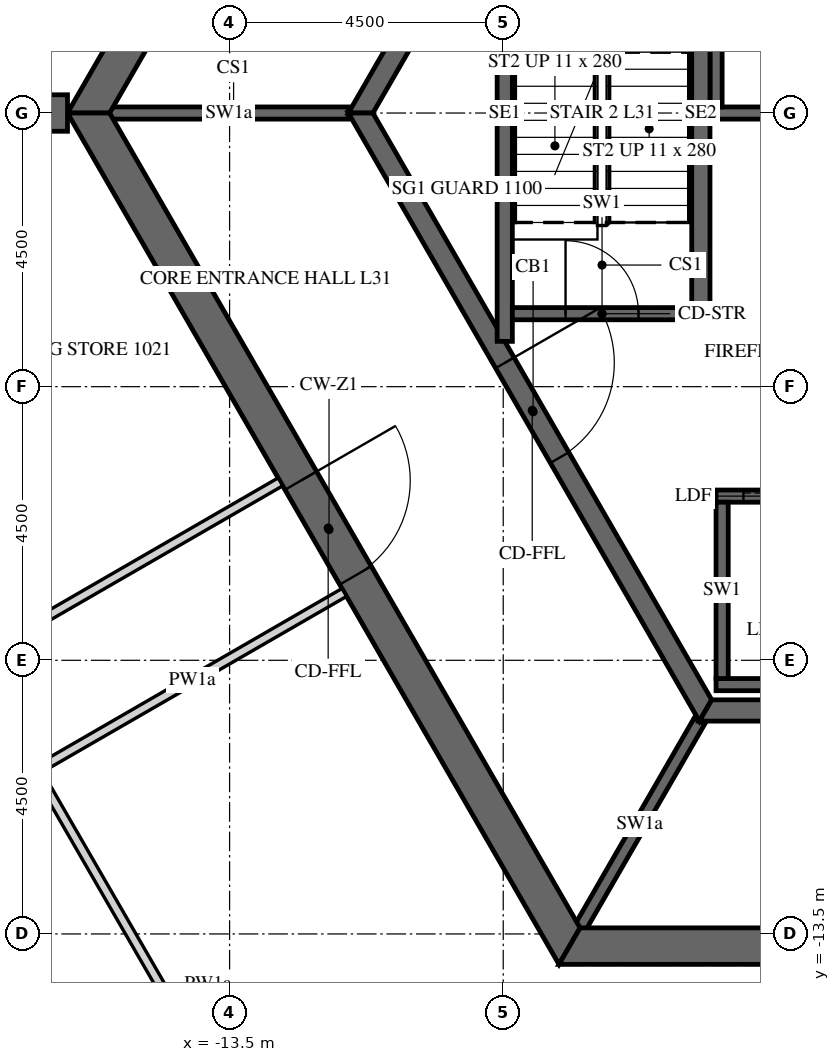
"""IFC4 building model, lengths in metres.
Left out: names, types, materials, properties, quantities, classifications, styles, units other than length and angle.
Written with IfcOpenShell. Run it as: python <this file> out.ifc"""

import sys

from ifc_helpers import new_model, si_unit, direction, frame, frame_2d, origin, place, context, subcontext, project, spatial, polyline, rectangle, outline, extrude, element, fill, save


model = new_model("IFC4")
c1 = context("Model", 3, precision=1e-05, world=origin(), true_north=direction((0.0, 1.0)))
c2 = subcontext(c1, "Body", "Model", "MODEL_VIEW")
j1 = project(units=[si_unit("LENGTHUNIT", "METRE"), si_unit("PLANEANGLEUNIT", "RADIAN")], contexts=[c1])
p1 = place(None, origin())
s1 = spatial("IfcSite", under=j1, at=p1, CompositionType="ELEMENT")
p2 = place(p1, origin())
s2 = spatial("IfcBuilding", under=s1, at=p2, CompositionType="ELEMENT")
p3 = place(p2, frame((0.0, 0.0, 135.0)))
s3 = spatial("IfcBuildingStorey", under=s2, at=p3, CompositionType="ELEMENT", Elevation=135.0)
p4 = place(p3, frame((-7.91, 13.7, -0.15), z_axis=(0.0, 0.0, 1.0), x_axis=(-0.499999880136, -0.866025472988, 0.0)))
e1 = element("IfcWall", 1, at=p4, inside=s3, PredefinedType="SHEAR", context=c2, shape_type="SweptSolid", body=[
    extrude(outline(polyline([(-0.173, -0.3), (15.993, -0.3), (15.646, 0.3), (0.173, 0.3), (-0.173, -0.3)])), origin(), (0.0, 0.0, 1.0), 3.9),
])
p5 = place(p4, frame((7.039, 0.0, 0.15)))
e2 = element("IfcOpeningElement", 2, at=p5, cuts=e1, PredefinedType="OPENING", context=c2, shape_type="SweptSolid", body=[
    extrude(rectangle(XDim=1.8, YDim=2.4, at=frame_2d((0.9, 1.2))), frame((0.0, 0.31, 0.0), z_axis=(0.0, -1.0, 0.0), x_axis=(1.0, 0.0, 0.0)), (0.0, 0.0, 1.0), 0.62),
])
p6 = place(p3, frame((-15.819, 0.0, -0.15), z_axis=(0.0, 0.0, 1.0), x_axis=(0.499999880136, -0.866025472988, 0.0)))
e3 = element("IfcWall", 3, at=p6, inside=s3, PredefinedType="SHEAR", context=c2, shape_type="SweptSolid", body=[
    extrude(outline(polyline([(-0.173, -0.3), (15.993, -0.3), (15.646, 0.3), (0.173, 0.3), (-0.173, -0.3)])), origin(), (0.0, 0.0, 1.0), 3.9),
])
p7 = place(p6, frame((6.981, 0.0, 0.15)))
e4 = element("IfcOpeningElement", 4, at=p7, cuts=e3, PredefinedType="OPENING", context=c2, shape_type="SweptSolid", body=[
    extrude(rectangle(XDim=1.8, YDim=2.4, at=frame_2d((0.9, 1.2))), frame((0.0, 0.31, 0.0), z_axis=(0.0, -1.0, 0.0), x_axis=(1.0, 0.0, 0.0)), (0.0, 0.0, 1.0), 0.62),
])
p8 = place(p3, frame((-7.91, -13.7, -0.15), z_axis=(0.0, 0.0, 1.0), x_axis=(1.0, 0.0, 0.0)))
e5 = element("IfcWall", 5, at=p8, inside=s3, PredefinedType="SHEAR", context=c2, shape_type="SweptSolid", body=[
    extrude(outline(polyline([(-0.173, -0.3), (15.993, -0.3), (15.646, 0.3), (0.173, 0.3), (-0.173, -0.3)])), origin(), (0.0, 0.0, 1.0), 3.9),
])
p9 = place(p8, frame((7.31, 0.0, 0.15)))
e6 = element("IfcOpeningElement", 6, at=p9, cuts=e5, PredefinedType="OPENING", context=c2, shape_type="SweptSolid", body=[
    extrude(rectangle(XDim=1.2, YDim=2.4, at=frame_2d((0.6, 1.2))), frame((0.0, 0.31, 0.0), z_axis=(0.0, -1.0, 0.0), x_axis=(1.0, 0.0, 0.0)), (0.0, 0.0, 1.0), 0.62),
])
p10 = place(p3, frame((-16.166, 0.0, -0.15), z_axis=(0.0, 0.0, 1.0), x_axis=(-1.0, 0.0, 0.0)))
e7 = element("IfcWall", 7, at=p10, inside=s3, PredefinedType="SHEAR", context=c2, shape_type="SweptSolid", body=[
    extrude(rectangle(XDim=16.509, YDim=0.6, at=frame_2d((8.254, 0.0))), origin(), (0.0, 0.0, 1.0), 3.9),
])
p11 = place(p10, frame((7.354, 0.0, 0.15)))
e8 = element("IfcOpeningElement", 8, at=p11, cuts=e7, PredefinedType="OPENING", context=c2, shape_type="SweptSolid", body=[
    extrude(rectangle(XDim=1.8, YDim=2.4, at=frame_2d((0.9, 1.2))), frame((0.0, 0.31, 0.0), z_axis=(0.0, -1.0, 0.0), x_axis=(1.0, 0.0, 0.0)), (0.0, 0.0, 1.0), 0.62),
])
p12 = place(p3, frame((-5.673, 9.825, -0.15), z_axis=(0.0, 0.0, 1.0), x_axis=(-0.499995046907, -0.866028263435, 0.0)))
e9 = element("IfcWall", 9, at=p12, inside=s3, PredefinedType="SHEAR", context=c2, shape_type="SweptSolid", body=[
    extrude(outline(polyline([(-0.101, -0.175), (11.446, -0.175), (11.244, 0.175), (0.101, 0.175), (-0.101, -0.175)])), origin(), (0.0, 0.0, 1.0), 3.9),
])
p13 = place(p12, frame((4.801, 0.0, 0.15)))
e10 = element("IfcOpeningElement", 10, at=p13, cuts=e9, PredefinedType="OPENING", context=c2, shape_type="SweptSolid", body=[
    extrude(rectangle(XDim=1.8, YDim=2.4, at=frame_2d((0.9, 1.2))), frame((0.0, 0.185, 0.0), z_axis=(0.0, -1.0, 0.0), x_axis=(1.0, 0.0, 0.0)), (0.0, 0.0, 1.0), 0.37),
])
p14 = place(p3, frame((-11.345, 0.0, -0.15), z_axis=(0.0, 0.0, 1.0), x_axis=(0.499995046907, -0.866028263435, 0.0)))
e11 = element("IfcWall", 11, at=p14, inside=s3, PredefinedType="SHEAR", context=c2, shape_type="SweptSolid", body=[
    extrude(outline(polyline([(-0.101, -0.175), (11.446, -0.175), (11.244, 0.175), (0.101, 0.175), (-0.101, -0.175)])), origin(), (0.0, 0.0, 1.0), 3.9),
])
p15 = place(p14, frame((4.744, 0.0, 0.15)))
e12 = element("IfcOpeningElement", 12, at=p15, cuts=e11, PredefinedType="OPENING", context=c2, shape_type="SweptSolid", body=[
    extrude(rectangle(XDim=1.8, YDim=2.4, at=frame_2d((0.9, 1.2))), frame((0.0, 0.185, 0.0), z_axis=(0.0, -1.0, 0.0), x_axis=(1.0, 0.0, 0.0)), (0.0, 0.0, 1.0), 0.37),
])
p16 = place(p3, frame((-5.673, -9.825, -0.15), z_axis=(0.0, 0.0, 1.0), x_axis=(1.0, 0.0, 0.0)))
e13 = element("IfcWall", 13, at=p16, inside=s3, PredefinedType="SHEAR", context=c2, shape_type="SweptSolid", body=[
    extrude(outline(polyline([(-0.101, -0.175), (11.446, -0.175), (11.244, 0.175), (0.101, 0.175), (-0.101, -0.175)])), origin(), (0.0, 0.0, 1.0), 3.9),
])
p17 = place(p3, frame((-5.6, 0.0, -0.25), z_axis=(0.0, 0.0, 1.0), x_axis=(1.0, 0.0, 0.0)))
e14 = element("IfcWall", 14, at=p17, inside=s3, PredefinedType="SHEAR", context=c2, shape_type="SweptSolid", body=[
    extrude(rectangle(XDim=11.2, YDim=0.2, at=frame_2d((5.6, 0.0))), origin(), (0.0, 0.0, 1.0), 3.9),
])
p18 = place(p3, frame((-5.5, 0.1, -0.25), z_axis=(0.0, 0.0, 1.0), x_axis=(0.0, 1.0, 0.0)))
e15 = element("IfcWall", 15, at=p18, inside=s3, PredefinedType="SHEAR", context=c2, shape_type="SweptSolid", body=[
    extrude(rectangle(XDim=3.1, YDim=0.2, at=frame_2d((1.55, 0.0))), origin(), (0.0, 0.0, 1.0), 3.9),
])
p19 = place(p3, frame((-5.5, -6.3, -0.25), z_axis=(0.0, 0.0, 1.0), x_axis=(1.0, 0.0, 0.0)))
e16 = element("IfcWall", 16, at=p19, inside=s3, PredefinedType="SHEAR", context=c2, shape_type="SweptSolid", body=[
    extrude(rectangle(XDim=9.2, YDim=0.2, at=frame_2d((4.6, 0.0))), origin(), (0.0, 0.0, 1.0), 3.9),
])
p20 = place(p19, frame((0.45, 0.0, 0.25)))
e17 = element("IfcOpeningElement", 17, at=p20, cuts=e16, PredefinedType="OPENING", context=c2, shape_type="SweptSolid", body=[
    extrude(rectangle(XDim=1.1, YDim=2.1, at=frame_2d((0.55, 1.05))), frame((0.0, 0.11, 0.0), z_axis=(0.0, -1.0, 0.0), x_axis=(1.0, 0.0, 0.0)), (0.0, 0.0, 1.0), 0.22),
])
p21 = place(p19, frame((2.25, 0.0, 0.25)))
e18 = element("IfcOpeningElement", 18, at=p21, cuts=e16, PredefinedType="OPENING", context=c2, shape_type="SweptSolid", body=[
    extrude(rectangle(XDim=1.1, YDim=2.1, at=frame_2d((0.55, 1.05))), frame((0.0, 0.11, 0.0), z_axis=(0.0, -1.0, 0.0), x_axis=(1.0, 0.0, 0.0)), (0.0, 0.0, 1.0), 0.22),
])
p22 = place(p19, frame((4.05, 0.0, 0.25)))
e19 = element("IfcOpeningElement", 19, at=p22, cuts=e16, PredefinedType="OPENING", context=c2, shape_type="SweptSolid", body=[
    extrude(rectangle(XDim=1.1, YDim=2.1, at=frame_2d((0.55, 1.05))), frame((0.0, 0.11, 0.0), z_axis=(0.0, -1.0, 0.0), x_axis=(1.0, 0.0, 0.0)), (0.0, 0.0, 1.0), 0.22),
])
p23 = place(p19, frame((5.85, 0.0, 0.25)))
e20 = element("IfcOpeningElement", 20, at=p23, cuts=e16, PredefinedType="OPENING", context=c2, shape_type="SweptSolid", body=[
    extrude(rectangle(XDim=1.1, YDim=2.1, at=frame_2d((0.55, 1.05))), frame((0.0, 0.11, 0.0), z_axis=(0.0, -1.0, 0.0), x_axis=(1.0, 0.0, 0.0)), (0.0, 0.0, 1.0), 0.22),
])
p24 = place(p19, frame((7.65, 0.0, 0.25)))
e21 = element("IfcOpeningElement", 21, at=p24, cuts=e16, PredefinedType="OPENING", context=c2, shape_type="SweptSolid", body=[
    extrude(rectangle(XDim=1.1, YDim=2.1, at=frame_2d((0.55, 1.05))), frame((0.0, 0.11, 0.0), z_axis=(0.0, -1.0, 0.0), x_axis=(1.0, 0.0, 0.0)), (0.0, 0.0, 1.0), 0.22),
])
p25 = place(p3, frame((-5.5, -9.4, -0.25), z_axis=(0.0, 0.0, 1.0), x_axis=(1.0, 0.0, 0.0)))
e22 = element("IfcWall", 22, at=p25, inside=s3, PredefinedType="SHEAR", context=c2, shape_type="SweptSolid", body=[
    extrude(rectangle(XDim=9.2, YDim=0.2, at=frame_2d((4.6, 0.0))), origin(), (0.0, 0.0, 1.0), 3.9),
])
p26 = place(p3, frame((-5.4, -9.3, -0.25), z_axis=(0.0, 0.0, 1.0), x_axis=(0.0, 1.0, 0.0)))
e23 = element("IfcWall", 23, at=p26, inside=s3, PredefinedType="SHEAR", context=c2, shape_type="SweptSolid", body=[
    extrude(rectangle(XDim=2.9, YDim=0.2, at=frame_2d((1.45, 0.0))), origin(), (0.0, 0.0, 1.0), 3.9),
])
p27 = place(p3, frame((-11.547, 0.0, -0.15), z_axis=(0.0, 0.0, 1.0), x_axis=(-1.0, 0.0, 0.0)))
e24 = element("IfcWall", 24, at=p27, inside=s3, PredefinedType="SHEAR", context=c2, shape_type="SweptSolid", body=[
    extrude(rectangle(XDim=3.926, YDim=0.2, at=frame_2d((1.963, 0.0))), origin(), (0.0, 0.0, 1.0), 3.9),
])
p28 = place(p3, frame((-5.773, -10.0, -0.15), z_axis=(0.0, 0.0, 1.0), x_axis=(-0.500038251005, -0.86600331843, 0.0)))
e25 = element("IfcWall", 25, at=p28, inside=s3, PredefinedType="SHEAR", context=c2, shape_type="SweptSolid", body=[
    extrude(rectangle(XDim=3.926, YDim=0.2, at=frame_2d((1.963, 0.0))), origin(), (0.0, 0.0, 1.0), 3.9),
])
p29 = place(p3, frame((-5.75, -3.4, -0.25), z_axis=(0.0, 0.0, 1.0), x_axis=(0.0, 1.0, 0.0)))
e26 = element("IfcWall", 26, at=p29, inside=s3, PredefinedType="SHEAR", context=c2, shape_type="SweptSolid", body=[
    extrude(rectangle(XDim=6.8, YDim=0.3, at=frame_2d((3.4, 0.0))), origin(), (0.0, 0.0, 1.0), 3.9),
])
p30 = place(p3, frame((-8.975, -3.755, -0.25), z_axis=(0.0, 0.0, 1.0), x_axis=(0.0, 1.0, 0.0)))
e27 = element("IfcWall", 27, at=p30, inside=s3, PredefinedType="SHEAR", context=c2, shape_type="SweptSolid", body=[
    extrude(rectangle(XDim=7.51, YDim=0.25, at=frame_2d((3.755, 0.0))), origin(), (0.0, 0.0, 1.0), 3.9),
])
p31 = place(p3, frame((-8.85, -3.3, -0.25), z_axis=(0.0, 0.0, 1.0), x_axis=(1.0, 0.0, 0.0)))
e28 = element("IfcWall", 28, at=p31, inside=s3, PredefinedType="SHEAR", context=c2, shape_type="SweptSolid", body=[
    extrude(rectangle(XDim=2.95, YDim=0.2, at=frame_2d((1.475, 0.0))), origin(), (0.0, 0.0, 1.0), 3.9),
])
p32 = place(p31, frame((0.875, 0.0, 0.25)))
e29 = element("IfcOpeningElement", 29, at=p32, cuts=e28, PredefinedType="OPENING", context=c2, shape_type="SweptSolid", body=[
    extrude(rectangle(XDim=1.2, YDim=2.4, at=frame_2d((0.6, 1.2))), frame((0.0, 0.11, 0.0), z_axis=(0.0, -1.0, 0.0), x_axis=(1.0, 0.0, 0.0)), (0.0, 0.0, 1.0), 0.22),
])
p33 = place(p3, frame((-23.743, -2.175, 0.0), z_axis=(0.0, 0.0, 1.0), x_axis=(0.499992353047, -0.86602981871, 0.0)))
e30 = element("IfcWall", 30, at=p33, inside=s3, PredefinedType="PARTITIONING", context=c2, shape_type="SweptSolid", body=[
    extrude(rectangle(XDim=23.516, YDim=0.15, at=frame_2d((11.758, 0.0))), origin(), (0.0, 0.0, 1.0), 2.838),
])
p34 = place(p33, frame((10.099, 0.0, 0.0)))
e31 = element("IfcOpeningElement", 31, at=p34, cuts=e30, PredefinedType="OPENING", context=c2, shape_type="SweptSolid", body=[
    extrude(rectangle(XDim=1.0, YDim=2.1, at=frame_2d((0.5, 1.05))), frame((0.0, 0.085, 0.0), z_axis=(0.0, -1.0, 0.0), x_axis=(1.0, 0.0, 0.0)), (0.0, 0.0, 1.0), 0.17),
])
p35 = place(p33, frame((17.358, 0.0, 0.0)))
e32 = element("IfcOpeningElement", 32, at=p35, cuts=e30, PredefinedType="OPENING", context=c2, shape_type="SweptSolid", body=[
    extrude(rectangle(XDim=1.0, YDim=2.1, at=frame_2d((0.5, 1.05))), frame((0.0, 0.085, 0.0), z_axis=(0.0, -1.0, 0.0), x_axis=(1.0, 0.0, 0.0)), (0.0, 0.0, 1.0), 0.17),
])
p36 = place(p3, frame((-12.664, -6.066, 0.0), z_axis=(0.0, 0.0, 1.0), x_axis=(-0.866018092707, -0.500012662943, 0.0)))
e33 = element("IfcWall", 33, at=p36, inside=s3, PredefinedType="PARTITIONING", context=c2, shape_type="SweptSolid", body=[
    extrude(rectangle(XDim=5.85, YDim=0.15, at=frame_2d((2.925, 0.0))), origin(), (0.0, 0.0, 1.0), 2.838),
])
p37 = place(p3, frame((-11.031, -20.595, 0.0), z_axis=(0.0, 0.0, 1.0), x_axis=(-0.499987422378, 0.866032665356, 0.0)))
e34 = element("IfcWall", 34, at=p37, inside=s3, PredefinedType="PARTITIONING", context=c2, shape_type="SweptSolid", body=[
    extrude(rectangle(XDim=11.299, YDim=0.15, at=frame_2d((5.649, 0.0))), origin(), (0.0, 0.0, 1.0), 2.838),
])
p38 = place(p37, frame((5.199, 0.0, 0.0)))
e35 = element("IfcOpeningElement", 35, at=p38, cuts=e34, PredefinedType="OPENING", context=c2, shape_type="SweptSolid", body=[
    extrude(rectangle(XDim=0.9, YDim=2.1, at=frame_2d((0.45, 1.05))), frame((0.0, 0.085, 0.0), z_axis=(0.0, -1.0, 0.0), x_axis=(1.0, 0.0, 0.0)), (0.0, 0.0, 1.0), 0.17),
])
p39 = place(p3, frame((-16.615, -10.772, 0.0), z_axis=(0.0, 0.0, 1.0), x_axis=(0.866025774745, 0.499999357477, 0.0)))
e36 = element("IfcWall", 36, at=p39, inside=s3, PredefinedType="PARTITIONING", context=c2, shape_type="SweptSolid", body=[
    extrude(rectangle(XDim=5.775, YDim=0.15, at=frame_2d((2.887, 0.0))), origin(), (0.0, 0.0, 1.0), 2.838),
])
p40 = place(p7, origin())
e37 = element("IfcDoor", 37, at=p40, inside=s3, OperationType="DOUBLE_DOOR_SINGLE_SWING", PredefinedType="DOOR", context=c2, shape_type="SweptSolid", body=[
    extrude(rectangle(XDim=1.8, YDim=2.4, at=frame_2d((0.9, 1.2))), frame((0.0, 0.025, 0.0), z_axis=(0.0, -1.0, 0.0), x_axis=(1.0, 0.0, 0.0)), (0.0, 0.0, 1.0), 0.05),
])
fill(e4, e37)
p41 = place(p15, origin())
e38 = element("IfcDoor", 38, at=p41, inside=s3, OperationType="DOUBLE_DOOR_SINGLE_SWING", PredefinedType="DOOR", context=c2, shape_type="SweptSolid", body=[
    extrude(rectangle(XDim=1.8, YDim=2.4, at=frame_2d((0.9, 1.2))), frame((0.0, 0.025, 0.0), z_axis=(0.0, -1.0, 0.0), x_axis=(1.0, 0.0, 0.0)), (0.0, 0.0, 1.0), 0.05),
])
fill(e12, e38)
p42 = place(p32, origin())
e39 = element("IfcDoor", 39, at=p42, inside=s3, OperationType="SINGLE_SWING_LEFT", PredefinedType="DOOR", context=c2, shape_type="SweptSolid", body=[
    extrude(rectangle(XDim=1.2, YDim=2.4, at=frame_2d((0.6, 1.2))), frame((0.0, 0.025, 0.0), z_axis=(0.0, -1.0, 0.0), x_axis=(1.0, 0.0, 0.0)), (0.0, 0.0, 1.0), 0.05),
])
fill(e29, e39)
p43 = place(p20, origin())
e40 = element("IfcDoor", 40, at=p43, inside=s3, OperationType="SLIDING_TO_LEFT", PredefinedType="DOOR", context=c2, shape_type="SweptSolid", body=[
    extrude(rectangle(XDim=1.1, YDim=2.1, at=frame_2d((0.55, 1.05))), frame((0.0, 0.025, 0.0), z_axis=(0.0, -1.0, 0.0), x_axis=(1.0, 0.0, 0.0)), (0.0, 0.0, 1.0), 0.05),
])
fill(e17, e40)
save(model, sys.argv[1])
